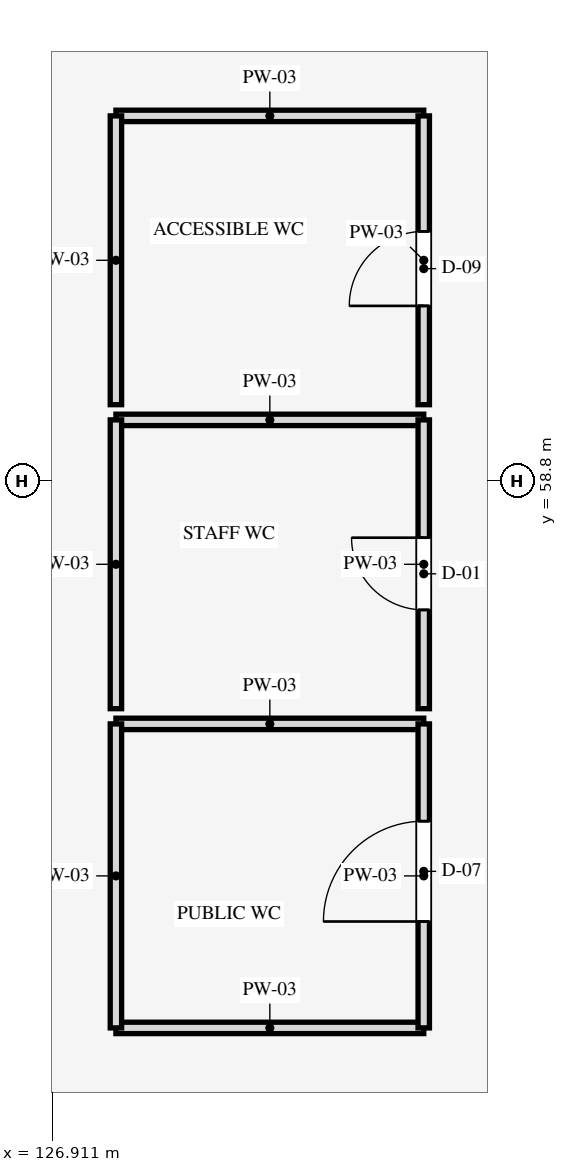
"""IFC4 building model, lengths in metres.
Left out: names, types, materials, properties, quantities, classifications, styles, units other than length and angle.
Written with IfcOpenShell. Run it as: python <this file> out.ifc"""

import sys

from ifc_helpers import new_model, si_unit, direction, frame, frame_2d, origin, place, context, subcontext, project, spatial, rectangle, extrude, element, fill, save


model = new_model("IFC4")
c1 = context("Model", 3, precision=1e-05, world=origin(), true_north=direction((0.0, 1.0)))
c2 = subcontext(c1, "Body", "Model", "MODEL_VIEW")
j1 = project(units=[si_unit("LENGTHUNIT", "METRE"), si_unit("PLANEANGLEUNIT", "RADIAN")], contexts=[c1])
p1 = place(None, origin())
s1 = spatial("IfcSite", under=j1, at=p1, CompositionType="ELEMENT")
p2 = place(p1, origin())
s2 = spatial("IfcBuilding", under=s1, at=p2, CompositionType="ELEMENT")
p3 = place(p2, frame((0.0, 0.0, 5.4)))
s3 = spatial("IfcBuildingStorey", under=s2, at=p3, CompositionType="ELEMENT", Elevation=5.4)
for number, where, z_axis, x_axis in (
    (1, (127.75, 51.6, 0.0), (0.0, 0.0, 1.0), (1.0, 0.0, 0.0)),
    (2, (127.75, 55.6, 0.0), (0.0, 0.0, 1.0), (1.0, 0.0, 0.0)),
):
    element("IfcWall", number, at=place(p3, frame(where, z_axis=z_axis, x_axis=x_axis)), inside=s3, PredefinedType="PARTITIONING", context=c2, shape_type="SweptSolid", body=[
        extrude(rectangle(XDim=4.05, YDim=0.15, at=frame_2d((2.025, 0.0))), origin(), (0.0, 0.0, 1.0), 3.54),
    ])
p4 = place(p3, frame((127.75, 51.6, 0.0), z_axis=(0.0, 0.0, 1.0), x_axis=(0.0, 1.0, 0.0)))
e3 = element("IfcWall", 3, at=p4, inside=s3, PredefinedType="PARTITIONING", context=c2, shape_type="SweptSolid", body=[
    extrude(rectangle(XDim=4.0, YDim=0.15, at=frame_2d((2.0, 0.0))), origin(), (0.0, 0.0, 1.0), 3.54),
])
p5 = place(p3, frame((131.8, 51.6, 0.0), z_axis=(0.0, 0.0, 1.0), x_axis=(0.0, 1.0, 0.0)))
e4 = element("IfcWall", 4, at=p5, inside=s3, PredefinedType="PARTITIONING", context=c2, shape_type="SweptSolid", body=[
    extrude(rectangle(XDim=4.0, YDim=0.15, at=frame_2d((2.0, 0.0))), origin(), (0.0, 0.0, 1.0), 3.54),
])
p6 = place(p5, frame((1.4, 0.0, 0.0)))
e5 = element("IfcOpeningElement", 5, at=p6, cuts=e4, PredefinedType="OPENING", context=c2, shape_type="SweptSolid", body=[
    extrude(rectangle(XDim=1.32, YDim=2.18, at=frame_2d((0.66, 1.09))), frame((0.0, 0.085, 0.0), z_axis=(0.0, -1.0, 0.0), x_axis=(1.0, 0.0, 0.0)), (0.0, 0.0, 1.0), 0.17),
])
p7 = place(p3, frame((127.75, 59.6, 0.0), z_axis=(0.0, 0.0, 1.0), x_axis=(1.0, 0.0, 0.0)))
e6 = element("IfcWall", 6, at=p7, inside=s3, PredefinedType="PARTITIONING", context=c2, shape_type="SweptSolid", body=[
    extrude(rectangle(XDim=4.05, YDim=0.15, at=frame_2d((2.025, 0.0))), origin(), (0.0, 0.0, 1.0), 3.54),
])
p8 = place(p3, frame((127.75, 55.8, 0.0), z_axis=(0.0, 0.0, 1.0), x_axis=(0.0, 1.0, 0.0)))
e7 = element("IfcWall", 7, at=p8, inside=s3, PredefinedType="PARTITIONING", context=c2, shape_type="SweptSolid", body=[
    extrude(rectangle(XDim=3.8, YDim=0.15, at=frame_2d((1.9, 0.0))), origin(), (0.0, 0.0, 1.0), 3.54),
])
p9 = place(p3, frame((131.8, 55.8, 0.0), z_axis=(0.0, 0.0, 1.0), x_axis=(0.0, 1.0, 0.0)))
e8 = element("IfcWall", 8, at=p9, inside=s3, PredefinedType="PARTITIONING", context=c2, shape_type="SweptSolid", body=[
    extrude(rectangle(XDim=3.8, YDim=0.15, at=frame_2d((1.9, 0.0))), origin(), (0.0, 0.0, 1.0), 3.54),
])
p10 = place(p9, frame((1.3, 0.0, 0.0)))
e9 = element("IfcOpeningElement", 9, at=p10, cuts=e8, PredefinedType="OPENING", context=c2, shape_type="SweptSolid", body=[
    extrude(rectangle(XDim=0.95, YDim=2.1, at=frame_2d((0.475, 1.05))), frame((0.0, 0.085, 0.0), z_axis=(0.0, -1.0, 0.0), x_axis=(1.0, 0.0, 0.0)), (0.0, 0.0, 1.0), 0.17),
])
p11 = place(p3, frame((127.75, 63.6, 0.0), z_axis=(0.0, 0.0, 1.0), x_axis=(1.0, 0.0, 0.0)))
e10 = element("IfcWall", 10, at=p11, inside=s3, PredefinedType="PARTITIONING", context=c2, shape_type="SweptSolid", body=[
    extrude(rectangle(XDim=4.05, YDim=0.15, at=frame_2d((2.025, 0.0))), origin(), (0.0, 0.0, 1.0), 3.54),
])
p12 = place(p3, frame((127.75, 59.8, 0.0), z_axis=(0.0, 0.0, 1.0), x_axis=(0.0, 1.0, 0.0)))
e11 = element("IfcWall", 11, at=p12, inside=s3, PredefinedType="PARTITIONING", context=c2, shape_type="SweptSolid", body=[
    extrude(rectangle(XDim=3.8, YDim=0.15, at=frame_2d((1.9, 0.0))), origin(), (0.0, 0.0, 1.0), 3.54),
])
p13 = place(p3, frame((131.8, 59.8, 0.0), z_axis=(0.0, 0.0, 1.0), x_axis=(0.0, 1.0, 0.0)))
e12 = element("IfcWall", 12, at=p13, inside=s3, PredefinedType="PARTITIONING", context=c2, shape_type="SweptSolid", body=[
    extrude(rectangle(XDim=3.8, YDim=0.15, at=frame_2d((1.9, 0.0))), origin(), (0.0, 0.0, 1.0), 3.54),
])
p14 = place(p13, frame((1.3, 0.0, 0.0)))
e13 = element("IfcOpeningElement", 13, at=p14, cuts=e12, PredefinedType="OPENING", context=c2, shape_type="SweptSolid", body=[
    extrude(rectangle(XDim=0.98, YDim=2.12, at=frame_2d((0.49, 1.06))), frame((0.0, 0.085, 0.0), z_axis=(0.0, -1.0, 0.0), x_axis=(1.0, 0.0, 0.0)), (0.0, 0.0, 1.0), 0.17),
])
p15 = place(p6, origin())
e14 = element("IfcDoor", 14, at=p15, inside=s3, OperationType="SINGLE_SWING_LEFT", PredefinedType="DOOR", context=c2, shape_type="SweptSolid", body=[
    extrude(rectangle(XDim=1.32, YDim=2.18, at=frame_2d((0.66, 1.09))), frame((0.0, 0.025, 0.0), z_axis=(0.0, -1.0, 0.0), x_axis=(1.0, 0.0, 0.0)), (0.0, 0.0, 1.0), 0.05),
])
fill(e5, e14)
p16 = place(p10, origin())
e15 = element("IfcDoor", 15, at=p16, inside=s3, OperationType="SINGLE_SWING_RIGHT", PredefinedType="DOOR", context=c2, shape_type="SweptSolid", body=[
    extrude(rectangle(XDim=0.95, YDim=2.1, at=frame_2d((0.475, 1.05))), frame((0.0, 0.025, 0.0), z_axis=(0.0, -1.0, 0.0), x_axis=(1.0, 0.0, 0.0)), (0.0, 0.0, 1.0), 0.05),
])
fill(e9, e15)
p17 = place(p14, origin())
e16 = element("IfcDoor", 16, at=p17, inside=s3, OperationType="SINGLE_SWING_LEFT", PredefinedType="DOOR", context=c2, shape_type="SweptSolid", body=[
    extrude(rectangle(XDim=0.98, YDim=2.12, at=frame_2d((0.49, 1.06))), frame((0.0, 0.025, 0.0), z_axis=(0.0, -1.0, 0.0), x_axis=(1.0, 0.0, 0.0)), (0.0, 0.0, 1.0), 0.05),
])
fill(e13, e16)
save(model, sys.argv[1])
